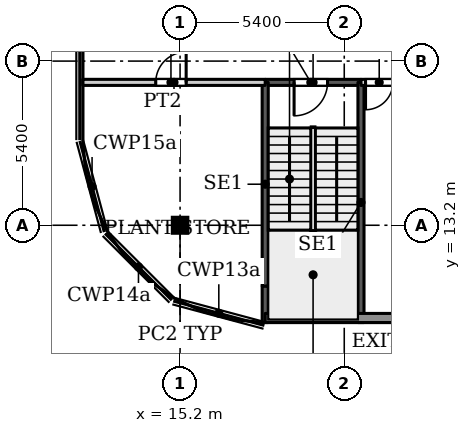
"""IFC4 building model, lengths in metres.
Left out: names, types, materials, properties, quantities, classifications, styles, units other than length and angle.
Written with IfcOpenShell. Run it as: python <this file> out.ifc"""

import sys

from ifc_helpers import new_model, si_unit, direction, frame, frame_2d, origin, origin_2d, place, context, subcontext, project, spatial, rectangle, i_section, extrude, source, transform, mapped, element, fill, save


model = new_model("IFC4")
c1 = context("Model", 3, precision=1e-05, world=origin(), true_north=direction((0.0, 1.0)))
c2 = subcontext(c1, "Body", "Model", "MODEL_VIEW")
j1 = project(units=[si_unit("LENGTHUNIT", "METRE"), si_unit("PLANEANGLEUNIT", "RADIAN")], contexts=[c1])
p1 = place(None, origin())
s1 = spatial("IfcSite", under=j1, at=p1, CompositionType="ELEMENT")
p2 = place(p1, origin())
s2 = spatial("IfcBuilding", under=s1, at=p2, CompositionType="ELEMENT")
p3 = place(p2, frame((0.0, 0.0, 17.0)))
s3 = spatial("IfcBuildingStorey", under=s2, at=p3, CompositionType="ELEMENT", Elevation=17.0)
p4 = place(p3, frame((15.2, 13.2, 0.0), z_axis=(0.0, 0.0, 1.0), x_axis=(1.0, 0.0, 0.0)))
e1 = element("IfcColumn", 1, at=p4, inside=s3, PredefinedType="COLUMN", context=c2, shape_type="SweptSolid", body=[
    extrude(i_section(OverallWidth=0.409, OverallDepth=0.425, WebThickness=0.033, FlangeThickness=0.052, FilletRadius=0.013, at=origin_2d()), origin(), (0.0, 0.0, 1.0), 4.5),
])
p5 = place(p3, frame((65.52, 10.15, 0.0), z_axis=(0.0, 0.0, 1.0), x_axis=(-1.0, 0.0, 0.0)))
e2 = element("IfcWall", 2, at=p5, inside=s3, PredefinedType="SOLIDWALL", context=c2, shape_type="SweptSolid", body=[
    extrude(rectangle(XDim=47.52, YDim=0.3, at=frame_2d((23.76, 0.0))), origin(), (0.0, 0.0, 1.0), 4.25),
])
p6 = place(p5, frame((1.683, 0.0, 0.9)))
e3 = element("IfcOpeningElement", 3, at=p6, cuts=e2, PredefinedType="OPENING", context=c2, shape_type="SweptSolid", body=[
    extrude(rectangle(XDim=2.7, YDim=2.1, at=frame_2d((1.35, 1.05))), frame((0.0, 0.16, 0.0), z_axis=(0.0, -1.0, 0.0), x_axis=(1.0, 0.0, 0.0)), (0.0, 0.0, 1.0), 0.32),
])
p7 = place(p5, frame((7.15, 0.0, 0.9)))
e4 = element("IfcOpeningElement", 4, at=p7, cuts=e2, PredefinedType="OPENING", context=c2, shape_type="SweptSolid", body=[
    extrude(rectangle(XDim=2.7, YDim=2.1, at=frame_2d((1.35, 1.05))), frame((0.0, 0.16, 0.0), z_axis=(0.0, -1.0, 0.0), x_axis=(1.0, 0.0, 0.0)), (0.0, 0.0, 1.0), 0.32),
])
p8 = place(p5, frame((12.617, 0.0, 0.9)))
e5 = element("IfcOpeningElement", 5, at=p8, cuts=e2, PredefinedType="OPENING", context=c2, shape_type="SweptSolid", body=[
    extrude(rectangle(XDim=2.7, YDim=2.1, at=frame_2d((1.35, 1.05))), frame((0.0, 0.16, 0.0), z_axis=(0.0, -1.0, 0.0), x_axis=(1.0, 0.0, 0.0)), (0.0, 0.0, 1.0), 0.32),
])
p9 = place(p5, frame((19.06, 0.0, 0.9)))
e6 = element("IfcOpeningElement", 6, at=p9, cuts=e2, PredefinedType="OPENING", context=c2, shape_type="SweptSolid", body=[
    extrude(rectangle(XDim=2.7, YDim=2.1, at=frame_2d((1.35, 1.05))), frame((0.0, 0.16, 0.0), z_axis=(0.0, -1.0, 0.0), x_axis=(1.0, 0.0, 0.0)), (0.0, 0.0, 1.0), 0.32),
])
p10 = place(p5, frame((25.28, 0.0, 0.9)))
e7 = element("IfcOpeningElement", 7, at=p10, cuts=e2, PredefinedType="OPENING", context=c2, shape_type="SweptSolid", body=[
    extrude(rectangle(XDim=2.7, YDim=2.1, at=frame_2d((1.35, 1.05))), frame((0.0, 0.16, 0.0), z_axis=(0.0, -1.0, 0.0), x_axis=(1.0, 0.0, 0.0)), (0.0, 0.0, 1.0), 0.32),
])
p11 = place(p5, frame((32.1, 0.0, 0.9)))
e8 = element("IfcOpeningElement", 8, at=p11, cuts=e2, PredefinedType="OPENING", context=c2, shape_type="SweptSolid", body=[
    extrude(rectangle(XDim=2.7, YDim=2.1, at=frame_2d((1.35, 1.05))), frame((0.0, 0.16, 0.0), z_axis=(0.0, -1.0, 0.0), x_axis=(1.0, 0.0, 0.0)), (0.0, 0.0, 1.0), 0.32),
])
p12 = place(p5, frame((38.32, 0.0, 0.9)))
e9 = element("IfcOpeningElement", 9, at=p12, cuts=e2, PredefinedType="OPENING", context=c2, shape_type="SweptSolid", body=[
    extrude(rectangle(XDim=2.7, YDim=2.1, at=frame_2d((1.35, 1.05))), frame((0.0, 0.16, 0.0), z_axis=(0.0, -1.0, 0.0), x_axis=(1.0, 0.0, 0.0)), (0.0, 0.0, 1.0), 0.32),
])
p13 = place(p3, frame((18.0, 17.9, 0.0), z_axis=(0.0, 0.0, 1.0), x_axis=(1.0, 0.0, 0.0)))
e10 = element("IfcWall", 10, at=p13, inside=s3, PredefinedType="SHEAR", context=c2, shape_type="SweptSolid", body=[
    extrude(rectangle(XDim=3.15, YDim=0.2, at=frame_2d((1.575, 0.0))), origin(), (0.0, 0.0, 1.0), 4.5),
])
p14 = place(p13, frame((0.95, 0.0, 0.0)))
e11 = element("IfcOpeningElement", 11, at=p14, cuts=e10, PredefinedType="OPENING", context=c2, shape_type="SweptSolid", body=[
    extrude(rectangle(XDim=1.1, YDim=2.2, at=frame_2d((0.55, 1.1))), frame((0.0, 0.11, 0.0), z_axis=(0.0, -1.0, 0.0), x_axis=(1.0, 0.0, 0.0)), (0.0, 0.0, 1.0), 0.22),
])
p15 = place(p3, frame((18.0, 10.0, 0.0), z_axis=(0.0, 0.0, 1.0), x_axis=(0.0, 1.0, 0.0)))
e12 = element("IfcWall", 12, at=p15, inside=s3, PredefinedType="SHEAR", context=c2, shape_type="SweptSolid", body=[
    extrude(rectangle(XDim=1.2, YDim=0.2, at=frame_2d((0.6, 0.0))), origin(), (0.0, 0.0, 1.0), 4.5),
])
p16 = place(p3, frame((18.0, 11.2, 0.0), z_axis=(0.0, 0.0, 1.0), x_axis=(0.0, 1.0, 0.0)))
e13 = element("IfcWall", 13, at=p16, inside=s3, PredefinedType="SHEAR", context=c2, shape_type="SweptSolid", body=[
    extrude(rectangle(XDim=6.7, YDim=0.2, at=frame_2d((3.35, 0.0))), origin(), (0.0, 0.0, 1.0), 4.5),
])
p17 = place(p3, frame((21.15, 10.0, 0.0), z_axis=(0.0, 0.0, 1.0), x_axis=(0.0, 1.0, 0.0)))
e14 = element("IfcWall", 14, at=p17, inside=s3, PredefinedType="SHEAR", context=c2, shape_type="SweptSolid", body=[
    extrude(rectangle(XDim=7.9, YDim=0.2, at=frame_2d((3.95, 0.0))), origin(), (0.0, 0.0, 1.0), 4.5),
])
p18 = place(p3, frame((12.0, 17.9, 0.0), z_axis=(0.0, 0.0, 1.0), x_axis=(1.0, 0.0, 0.0)))
e15 = element("IfcWall", 15, at=p18, inside=s3, PredefinedType="PARTITIONING", context=c2, shape_type="SweptSolid", body=[
    extrude(rectangle(XDim=6.0, YDim=0.2, at=frame_2d((3.0, 0.0))), origin(), (0.0, 0.0, 1.0), 4.18),
])
p19 = place(p18, frame((2.4, 0.0, 0.0)))
e16 = element("IfcOpeningElement", 16, at=p19, cuts=e15, PredefinedType="OPENING", context=c2, shape_type="SweptSolid", body=[
    extrude(rectangle(XDim=1.0, YDim=2.1, at=frame_2d((0.5, 1.05))), frame((0.0, 0.11, 0.0), z_axis=(0.0, -1.0, 0.0), x_axis=(1.0, 0.0, 0.0)), (0.0, 0.0, 1.0), 0.22),
])
p20 = place(p3, frame((21.15, 17.9, 0.0), z_axis=(0.0, 0.0, 1.0), x_axis=(1.0, 0.0, 0.0)))
e17 = element("IfcWall", 17, at=p20, inside=s3, PredefinedType="PARTITIONING", context=c2, shape_type="SweptSolid", body=[
    extrude(rectangle(XDim=96.85, YDim=0.2, at=frame_2d((48.425, 0.0))), origin(), (0.0, 0.0, 1.0), 4.18),
])
p21 = place(p20, frame((0.15, 0.0, 0.0)))
e18 = element("IfcOpeningElement", 18, at=p21, cuts=e17, PredefinedType="OPENING", context=c2, shape_type="SweptSolid", body=[
    extrude(rectangle(XDim=0.9, YDim=2.1, at=frame_2d((0.45, 1.05))), frame((0.0, 0.11, 0.0), z_axis=(0.0, -1.0, 0.0), x_axis=(1.0, 0.0, 0.0)), (0.0, 0.0, 1.0), 0.22),
])
p22 = place(p20, frame((7.185, 0.0, 0.0)))
e19 = element("IfcOpeningElement", 19, at=p22, cuts=e17, PredefinedType="OPENING", context=c2, shape_type="SweptSolid", body=[
    extrude(rectangle(XDim=1.0, YDim=2.1, at=frame_2d((0.5, 1.05))), frame((0.0, 0.11, 0.0), z_axis=(0.0, -1.0, 0.0), x_axis=(1.0, 0.0, 0.0)), (0.0, 0.0, 1.0), 0.22),
])
p23 = place(p20, frame((20.228, 0.0, 0.0)))
e20 = element("IfcOpeningElement", 20, at=p23, cuts=e17, PredefinedType="OPENING", context=c2, shape_type="SweptSolid", body=[
    extrude(rectangle(XDim=1.0, YDim=2.1, at=frame_2d((0.5, 1.05))), frame((0.0, 0.11, 0.0), z_axis=(0.0, -1.0, 0.0), x_axis=(1.0, 0.0, 0.0)), (0.0, 0.0, 1.0), 0.22),
])
p24 = place(p20, frame((36.022, 0.0, 0.0)))
e21 = element("IfcOpeningElement", 21, at=p24, cuts=e17, PredefinedType="OPENING", context=c2, shape_type="SweptSolid", body=[
    extrude(rectangle(XDim=1.0, YDim=2.1, at=frame_2d((0.5, 1.05))), frame((0.0, 0.11, 0.0), z_axis=(0.0, -1.0, 0.0), x_axis=(1.0, 0.0, 0.0)), (0.0, 0.0, 1.0), 0.22),
])
p25 = place(p20, frame((51.533, 0.0, 0.0)))
e22 = element("IfcOpeningElement", 22, at=p25, cuts=e17, PredefinedType="OPENING", context=c2, shape_type="SweptSolid", body=[
    extrude(rectangle(XDim=1.0, YDim=2.1, at=frame_2d((0.5, 1.05))), frame((0.0, 0.11, 0.0), z_axis=(0.0, -1.0, 0.0), x_axis=(1.0, 0.0, 0.0)), (0.0, 0.0, 1.0), 0.22),
])
p26 = place(p20, frame((62.076, 0.0, 0.0)))
e23 = element("IfcOpeningElement", 23, at=p26, cuts=e17, PredefinedType="OPENING", context=c2, shape_type="SweptSolid", body=[
    extrude(rectangle(XDim=1.0, YDim=2.1, at=frame_2d((0.5, 1.05))), frame((0.0, 0.11, 0.0), z_axis=(0.0, -1.0, 0.0), x_axis=(1.0, 0.0, 0.0)), (0.0, 0.0, 1.0), 0.22),
])
p27 = place(p20, frame((76.402, 0.0, 0.0)))
e24 = element("IfcOpeningElement", 24, at=p27, cuts=e17, PredefinedType="OPENING", context=c2, shape_type="SweptSolid", body=[
    extrude(rectangle(XDim=1.0, YDim=2.1, at=frame_2d((0.5, 1.05))), frame((0.0, 0.11, 0.0), z_axis=(0.0, -1.0, 0.0), x_axis=(1.0, 0.0, 0.0)), (0.0, 0.0, 1.0), 0.22),
])
p28 = place(p20, frame((91.522, 0.0, 0.0)))
e25 = element("IfcOpeningElement", 25, at=p28, cuts=e17, PredefinedType="OPENING", context=c2, shape_type="SweptSolid", body=[
    extrude(rectangle(XDim=1.0, YDim=2.1, at=frame_2d((0.5, 1.05))), frame((0.0, 0.11, 0.0), z_axis=(0.0, -1.0, 0.0), x_axis=(1.0, 0.0, 0.0)), (0.0, 0.0, 1.0), 0.22),
])
m1 = source(origin(), c2, "Body", "SweptSolid", [
    extrude(rectangle(XDim=1.1, YDim=2.2, at=frame_2d((0.55, 1.1))), frame((0.0, 0.025, 0.0), z_axis=(0.0, -1.0, 0.0), x_axis=(1.0, 0.0, 0.0)), (0.0, 0.0, 1.0), 0.05),
])
p29 = place(p14, origin())
e26 = element("IfcDoor", 26, at=p29, inside=s3, OperationType="SINGLE_SWING_RIGHT", PredefinedType="DOOR", context=c2, shape_type="MappedRepresentation", body=[
    mapped(m1, transform((0.0, 0.0, 0.0), x_axis=(1.0, 0.0, 0.0), y_axis=(0.0, 1.0, 0.0), z_axis=(0.0, 0.0, 1.0), scale=1.0)),
])
fill(e11, e26)
m2 = source(origin(), c2, "Body", "SweptSolid", [
    extrude(rectangle(XDim=1.0, YDim=2.1, at=frame_2d((0.5, 1.05))), frame((0.0, 0.025, 0.0), z_axis=(0.0, -1.0, 0.0), x_axis=(1.0, 0.0, 0.0)), (0.0, 0.0, 1.0), 0.05),
])
p30 = place(p19, origin())
e27 = element("IfcDoor", 27, at=p30, inside=s3, OperationType="SINGLE_SWING_LEFT", PredefinedType="DOOR", context=c2, shape_type="MappedRepresentation", body=[
    mapped(m2, transform((0.0, 0.0, 0.0), x_axis=(1.0, 0.0, 0.0), y_axis=(0.0, 1.0, 0.0), z_axis=(0.0, 0.0, 1.0), scale=1.0)),
])
fill(e16, e27)
m3 = source(origin(), c2, "Body", "SweptSolid", [
    extrude(rectangle(XDim=0.9, YDim=2.1, at=frame_2d((0.45, 1.05))), frame((0.0, 0.025, 0.0), z_axis=(0.0, -1.0, 0.0), x_axis=(1.0, 0.0, 0.0)), (0.0, 0.0, 1.0), 0.05),
])
p31 = place(p21, origin())
e28 = element("IfcDoor", 28, at=p31, inside=s3, OperationType="SINGLE_SWING_RIGHT", PredefinedType="DOOR", context=c2, shape_type="MappedRepresentation", body=[
    mapped(m3, transform((0.0, 0.0, 0.0), x_axis=(1.0, 0.0, 0.0), y_axis=(0.0, 1.0, 0.0), z_axis=(0.0, 0.0, 1.0), scale=1.0)),
])
fill(e18, e28)
save(model, sys.argv[1])
